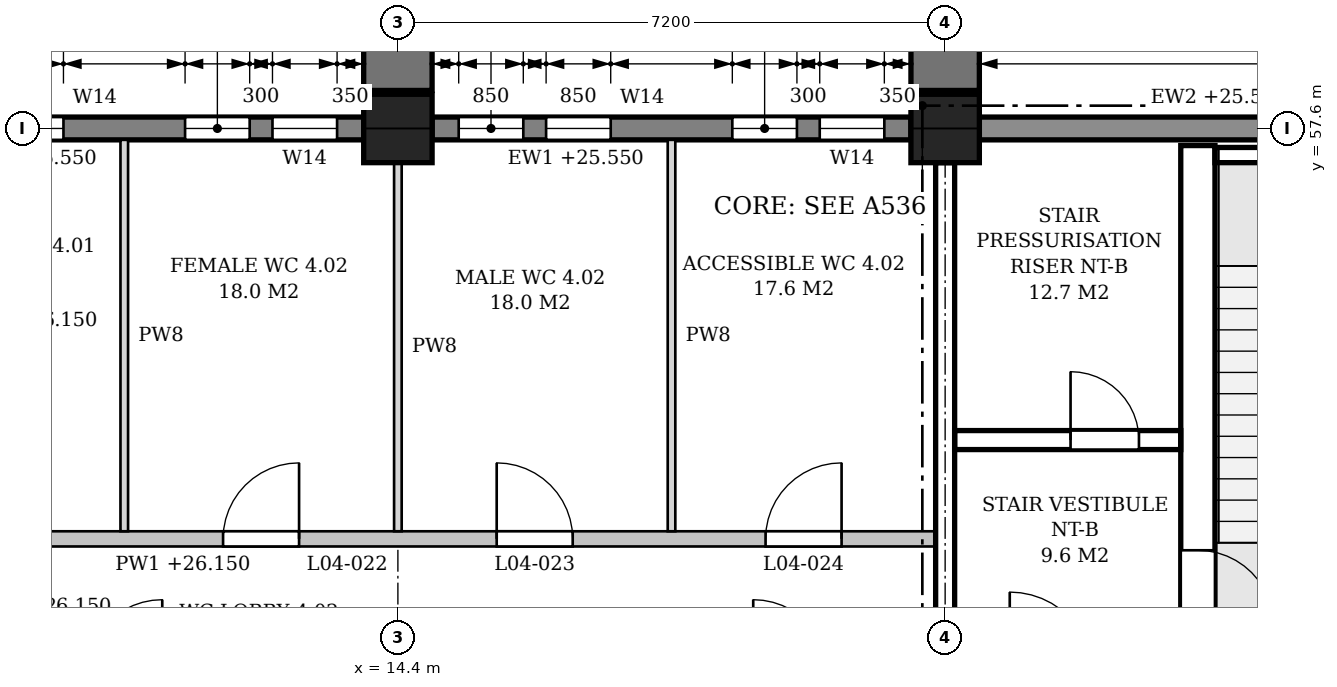
"""IFC4 building model, lengths in metres.
Left out: names, types, materials, properties, quantities, classifications, styles, units other than length and angle.
Written with IfcOpenShell. Run it as: python <this file> out.ifc"""

import sys

from ifc_helpers import new_model, si_unit, direction, frame, frame_2d, origin, origin_2d, place, context, subcontext, project, spatial, polyline, rectangle, outline, extrude, element, fill, save


model = new_model("IFC4")
c1 = context("Model", 3, precision=1e-05, world=origin(), true_north=direction((0.0, 1.0)))
c2 = subcontext(c1, "Body", "Model", "MODEL_VIEW")
j1 = project(units=[si_unit("LENGTHUNIT", "METRE"), si_unit("PLANEANGLEUNIT", "RADIAN")], contexts=[c1])
p1 = place(None, origin())
s1 = spatial("IfcSite", under=j1, at=p1, CompositionType="ELEMENT")
p2 = place(p1, origin())
s2 = spatial("IfcBuilding", under=s1, at=p2, CompositionType="ELEMENT")
p3 = place(p2, frame((0.0, 0.0, 21.6)))
s3 = spatial("IfcBuildingStorey", under=s2, at=p3, CompositionType="ELEMENT", Elevation=21.6)
for number, where, z_axis, x_axis in (
    (1, (14.4, 57.6, 0.0), (0.0, 0.0, 1.0), (1.0, 0.0, 0.0)),
    (2, (21.6, 57.6, 0.0), (0.0, 0.0, 1.0), (1.0, 0.0, 0.0)),
):
    element("IfcColumn", number, at=place(p3, frame(where, z_axis=z_axis, x_axis=x_axis)), inside=s3, PredefinedType="COLUMN", context=c2, shape_type="SweptSolid", body=[
        extrude(rectangle(XDim=0.9, YDim=0.9, at=origin_2d()), origin(), (0.0, 0.0, 1.0), 4.8),
    ])
p4 = place(p3, frame((28.35, 57.6, 0.0), z_axis=(0.0, 0.0, 1.0), x_axis=(-1.0, 0.0, 0.0)))
e3 = element("IfcWall", 3, at=p4, inside=s3, PredefinedType="STANDARD", context=c2, shape_type="SweptSolid", body=[
    extrude(rectangle(XDim=6.3, YDim=0.3, at=frame_2d((3.15, 0.0))), origin(), (0.0, 0.0, 1.0), 3.95),
])
p5 = place(p4, frame((0.9, 0.0, 0.9)))
e4 = element("IfcOpeningElement", 4, at=p5, cuts=e3, PredefinedType="OPENING", context=c2, shape_type="SweptSolid", body=[
    extrude(outline(polyline([(0.0, 0.0), (0.9, 0.0), (0.9, 2.05), (0.45, 2.5), (0.0, 2.05), (0.0, 0.0)])), frame((0.0, 0.16, 0.0), z_axis=(0.0, -1.0, 0.0), x_axis=(1.0, 0.0, 0.0)), (0.0, 0.0, 1.0), 0.32),
])
p6 = place(p3, frame((21.15, 57.6, 0.0), z_axis=(0.0, 0.0, 1.0), x_axis=(-1.0, 0.0, 0.0)))
e5 = element("IfcWall", 5, at=p6, inside=s3, PredefinedType="STANDARD", context=c2, shape_type="SweptSolid", body=[
    extrude(rectangle(XDim=6.3, YDim=0.3, at=frame_2d((3.15, 0.0))), origin(), (0.0, 0.0, 1.0), 3.95),
])
p7 = place(p6, frame((0.35, 0.0, 0.9)))
e6 = element("IfcOpeningElement", 6, at=p7, cuts=e5, PredefinedType="OPENING", context=c2, shape_type="SweptSolid", body=[
    extrude(outline(polyline([(0.0, 0.0), (0.85, 0.0), (0.85, 2.05), (0.425, 2.5), (0.0, 2.05), (0.0, 0.0)])), frame((0.0, 0.16, 0.0), z_axis=(0.0, -1.0, 0.0), x_axis=(1.0, 0.0, 0.0)), (0.0, 0.0, 1.0), 0.32),
])
p8 = place(p6, frame((1.5, 0.0, 0.9)))
e7 = element("IfcOpeningElement", 7, at=p8, cuts=e5, PredefinedType="OPENING", context=c2, shape_type="SweptSolid", body=[
    extrude(outline(polyline([(0.0, 0.0), (0.85, 0.0), (0.85, 2.05), (0.425, 2.5), (0.0, 2.05), (0.0, 0.0)])), frame((0.0, 0.16, 0.0), z_axis=(0.0, -1.0, 0.0), x_axis=(1.0, 0.0, 0.0)), (0.0, 0.0, 1.0), 0.32),
])
p9 = place(p6, frame((3.95, 0.0, 0.9)))
e8 = element("IfcOpeningElement", 8, at=p9, cuts=e5, PredefinedType="OPENING", context=c2, shape_type="SweptSolid", body=[
    extrude(outline(polyline([(0.0, 0.0), (0.85, 0.0), (0.85, 2.05), (0.425, 2.5), (0.0, 2.05), (0.0, 0.0)])), frame((0.0, 0.16, 0.0), z_axis=(0.0, -1.0, 0.0), x_axis=(1.0, 0.0, 0.0)), (0.0, 0.0, 1.0), 0.32),
])
p10 = place(p6, frame((5.1, 0.0, 0.9)))
e9 = element("IfcOpeningElement", 9, at=p10, cuts=e5, PredefinedType="OPENING", context=c2, shape_type="SweptSolid", body=[
    extrude(outline(polyline([(0.0, 0.0), (0.85, 0.0), (0.85, 2.05), (0.425, 2.5), (0.0, 2.05), (0.0, 0.0)])), frame((0.0, 0.16, 0.0), z_axis=(0.0, -1.0, 0.0), x_axis=(1.0, 0.0, 0.0)), (0.0, 0.0, 1.0), 0.32),
])
p11 = place(p3, frame((13.95, 57.6, 0.0), z_axis=(0.0, 0.0, 1.0), x_axis=(-1.0, 0.0, 0.0)))
e10 = element("IfcWall", 10, at=p11, inside=s3, PredefinedType="STANDARD", context=c2, shape_type="SweptSolid", body=[
    extrude(rectangle(XDim=6.3, YDim=0.3, at=frame_2d((3.15, 0.0))), origin(), (0.0, 0.0, 1.0), 3.95),
])
p12 = place(p11, frame((0.35, 0.0, 0.9)))
e11 = element("IfcOpeningElement", 11, at=p12, cuts=e10, PredefinedType="OPENING", context=c2, shape_type="SweptSolid", body=[
    extrude(outline(polyline([(0.0, 0.0), (0.85, 0.0), (0.85, 2.05), (0.425, 2.5), (0.0, 2.05), (0.0, 0.0)])), frame((0.0, 0.16, 0.0), z_axis=(0.0, -1.0, 0.0), x_axis=(1.0, 0.0, 0.0)), (0.0, 0.0, 1.0), 0.32),
])
p13 = place(p11, frame((1.5, 0.0, 0.9)))
e12 = element("IfcOpeningElement", 12, at=p13, cuts=e10, PredefinedType="OPENING", context=c2, shape_type="SweptSolid", body=[
    extrude(outline(polyline([(0.0, 0.0), (0.85, 0.0), (0.85, 2.05), (0.425, 2.5), (0.0, 2.05), (0.0, 0.0)])), frame((0.0, 0.16, 0.0), z_axis=(0.0, -1.0, 0.0), x_axis=(1.0, 0.0, 0.0)), (0.0, 0.0, 1.0), 0.32),
])
p14 = place(p11, frame((3.95, 0.0, 0.9)))
e13 = element("IfcOpeningElement", 13, at=p14, cuts=e10, PredefinedType="OPENING", context=c2, shape_type="SweptSolid", body=[
    extrude(outline(polyline([(0.0, 0.0), (0.85, 0.0), (0.85, 2.05), (0.425, 2.5), (0.0, 2.05), (0.0, 0.0)])), frame((0.0, 0.16, 0.0), z_axis=(0.0, -1.0, 0.0), x_axis=(1.0, 0.0, 0.0)), (0.0, 0.0, 1.0), 0.32),
])
p15 = place(p11, frame((5.1, 0.0, 0.9)))
e14 = element("IfcOpeningElement", 14, at=p15, cuts=e10, PredefinedType="OPENING", context=c2, shape_type="SweptSolid", body=[
    extrude(outline(polyline([(0.0, 0.0), (0.85, 0.0), (0.85, 2.05), (0.425, 2.5), (0.0, 2.05), (0.0, 0.0)])), frame((0.0, 0.16, 0.0), z_axis=(0.0, -1.0, 0.0), x_axis=(1.0, 0.0, 0.0)), (0.0, 0.0, 1.0), 0.32),
])
for number, where, z_axis, x_axis in (
    (15, (14.4, 58.1, -0.25), (0.0, 0.0, 1.0), (0.0, 1.0, 0.0)),
    (16, (21.6, 58.1, -0.25), (0.0, 0.0, 1.0), (0.0, 1.0, 0.0)),
):
    element("IfcWall", number, at=place(p3, frame(where, z_axis=z_axis, x_axis=x_axis)), inside=s3, PredefinedType="POLYGONAL", context=c2, shape_type="SweptSolid", body=[
        extrude(outline(polyline([(1.3, 0.0), (1.3, 18.9), (1.1, 19.2), (0.0, 19.2), (0.0, 0.0), (1.3, 0.0)])), frame((0.0, 0.45, 0.0), z_axis=(0.0, -1.0, 0.0), x_axis=(1.0, 0.0, 0.0)), (0.0, 0.0, 1.0), 0.9),
    ])
p16 = place(p3, frame((21.6, 50.85, 0.0), z_axis=(0.0, 0.0, 1.0), x_axis=(0.0, 1.0, 0.0)))
e17 = element("IfcWall", 17, at=p16, inside=s3, PredefinedType="SHEAR", context=c2, shape_type="SweptSolid", body=[
    extrude(rectangle(XDim=6.3, YDim=0.25, at=frame_2d((3.15, 0.0))), origin(), (0.0, 0.0, 1.0), 3.8),
])
p17 = place(p3, frame((25.15, 57.25, -0.25), z_axis=(0.0, 0.0, 1.0), x_axis=(1.0, 0.0, 0.0)))
e18 = element("IfcWall", 18, at=p17, inside=s3, PredefinedType="SHEAR", context=c2, shape_type="SweptSolid", body=[
    extrude(rectangle(XDim=1.4, YDim=0.2, at=frame_2d((0.7, 0.0))), origin(), (0.0, 0.0, 1.0), 4.8),
])
p18 = place(p3, frame((24.925, 50.525, 0.0), z_axis=(0.0, 0.0, 1.0), x_axis=(0.0, 1.0, 0.0)))
e19 = element("IfcWall", 19, at=p18, inside=s3, PredefinedType="SHEAR", context=c2, shape_type="SweptSolid", body=[
    extrude(rectangle(XDim=6.85, YDim=0.45, at=frame_2d((3.425, 0.0))), origin(), (0.0, 0.0, 1.0), 4.55),
])
p19 = place(p18, frame((0.525, 0.0, 0.0)))
e20 = element("IfcOpeningElement", 20, at=p19, cuts=e19, PredefinedType="OPENING", context=c2, shape_type="SweptSolid", body=[
    extrude(rectangle(XDim=1.0, YDim=2.1, at=frame_2d((0.5, 1.05))), frame((0.0, 0.235, 0.0), z_axis=(0.0, -1.0, 0.0), x_axis=(1.0, 0.0, 0.0)), (0.0, 0.0, 1.0), 0.47),
])
p20 = place(p3, frame((21.725, 53.5, 0.0), z_axis=(0.0, 0.0, 1.0), x_axis=(1.0, 0.0, 0.0)))
e21 = element("IfcWall", 21, at=p20, inside=s3, PredefinedType="SHEAR", context=c2, shape_type="SweptSolid", body=[
    extrude(rectangle(XDim=2.975, YDim=0.25, at=frame_2d((1.487, 0.0))), origin(), (0.0, 0.0, 1.0), 4.55),
])
p21 = place(p20, frame((1.525, 0.0, 0.0)))
e22 = element("IfcOpeningElement", 22, at=p21, cuts=e21, PredefinedType="OPENING", context=c2, shape_type="SweptSolid", body=[
    extrude(rectangle(XDim=0.9, YDim=2.1, at=frame_2d((0.45, 1.05))), frame((0.0, 0.135, 0.0), z_axis=(0.0, -1.0, 0.0), x_axis=(1.0, 0.0, 0.0)), (0.0, 0.0, 1.0), 0.27),
])
p22 = place(p3, frame((7.325, 52.2, 0.0), z_axis=(0.0, 0.0, 1.0), x_axis=(1.0, 0.0, 0.0)))
e23 = element("IfcWall", 23, at=p22, inside=s3, PredefinedType="PARTITIONING", context=c2, shape_type="SweptSolid", body=[
    extrude(outline(polyline([(0.0, 0.0), (14.15, 0.0), (14.15, 3.8), (14.025, 3.8), (14.025, 4.55), (7.325, 4.55), (7.325, 3.8), (6.825, 3.8), (6.825, 4.55), (0.125, 4.55), (0.125, 3.8), (0.0, 3.8), (0.0, 0.0)])), frame((0.0, 0.1, 0.0), z_axis=(0.0, -1.0, 0.0), x_axis=(1.0, 0.0, 0.0)), (0.0, 0.0, 1.0), 0.2),
])
p23 = place(p22, frame((1.238, 0.0, 0.0)))
e24 = element("IfcOpeningElement", 24, at=p23, cuts=e23, PredefinedType="OPENING", context=c2, shape_type="SweptSolid", body=[
    extrude(rectangle(XDim=1.0, YDim=2.1, at=frame_2d((0.5, 1.05))), frame((0.0, 0.11, 0.0), z_axis=(0.0, -1.0, 0.0), x_axis=(1.0, 0.0, 0.0)), (0.0, 0.0, 1.0), 0.22),
])
p24 = place(p22, frame((4.775, 0.0, 0.0)))
e25 = element("IfcOpeningElement", 25, at=p24, cuts=e23, PredefinedType="OPENING", context=c2, shape_type="SweptSolid", body=[
    extrude(rectangle(XDim=1.0, YDim=2.1, at=frame_2d((0.5, 1.05))), frame((0.0, 0.11, 0.0), z_axis=(0.0, -1.0, 0.0), x_axis=(1.0, 0.0, 0.0)), (0.0, 0.0, 1.0), 0.22),
])
p25 = place(p22, frame((8.375, 0.0, 0.0)))
e26 = element("IfcOpeningElement", 26, at=p25, cuts=e23, PredefinedType="OPENING", context=c2, shape_type="SweptSolid", body=[
    extrude(rectangle(XDim=1.0, YDim=2.1, at=frame_2d((0.5, 1.05))), frame((0.0, 0.11, 0.0), z_axis=(0.0, -1.0, 0.0), x_axis=(1.0, 0.0, 0.0)), (0.0, 0.0, 1.0), 0.22),
])
p26 = place(p22, frame((11.913, 0.0, 0.0)))
e27 = element("IfcOpeningElement", 27, at=p26, cuts=e23, PredefinedType="OPENING", context=c2, shape_type="SweptSolid", body=[
    extrude(rectangle(XDim=1.0, YDim=2.1, at=frame_2d((0.5, 1.05))), frame((0.0, 0.11, 0.0), z_axis=(0.0, -1.0, 0.0), x_axis=(1.0, 0.0, 0.0)), (0.0, 0.0, 1.0), 0.22),
])
p27 = place(p3, frame((10.8, 52.3, 0.0), z_axis=(0.0, 0.0, 1.0), x_axis=(0.0, 1.0, 0.0)))
e28 = element("IfcWall", 28, at=p27, inside=s3, PredefinedType="PARTITIONING", context=c2, shape_type="SweptSolid", body=[
    extrude(rectangle(XDim=5.15, YDim=0.1, at=frame_2d((2.575, 0.0))), origin(), (0.0, 0.0, 1.0), 3.8),
])
p28 = place(p3, frame((14.4, 52.3, 0.0), z_axis=(0.0, 0.0, 1.0), x_axis=(0.0, 1.0, 0.0)))
e29 = element("IfcWall", 29, at=p28, inside=s3, PredefinedType="PARTITIONING", context=c2, shape_type="SweptSolid", body=[
    extrude(rectangle(XDim=4.85, YDim=0.1, at=frame_2d((2.425, 0.0))), origin(), (0.0, 0.0, 1.0), 3.8),
])
p29 = place(p3, frame((18.0, 52.3, 0.0), z_axis=(0.0, 0.0, 1.0), x_axis=(0.0, 1.0, 0.0)))
e30 = element("IfcWall", 30, at=p29, inside=s3, PredefinedType="PARTITIONING", context=c2, shape_type="SweptSolid", body=[
    extrude(rectangle(XDim=5.15, YDim=0.1, at=frame_2d((2.575, 0.0))), origin(), (0.0, 0.0, 1.0), 3.8),
])
p30 = place(p7, origin())
e31 = element("IfcWindow", 31, at=p30, inside=s3, PartitioningType="SINGLE_PANEL", PredefinedType="WINDOW", context=c2, shape_type="SweptSolid", body=[
    extrude(outline(polyline([(0.0, 0.0), (0.85, 0.0), (0.85, 2.05), (0.425, 2.5), (0.0, 2.05), (0.0, 0.0)])), frame((0.0, 0.03, 0.0), z_axis=(0.0, -1.0, 0.0), x_axis=(1.0, 0.0, 0.0)), (0.0, 0.0, 1.0), 0.06),
])
fill(e6, e31)
p31 = place(p8, origin())
e32 = element("IfcWindow", 32, at=p31, inside=s3, PartitioningType="SINGLE_PANEL", PredefinedType="WINDOW", context=c2, shape_type="SweptSolid", body=[
    extrude(outline(polyline([(0.0, 0.0), (0.85, 0.0), (0.85, 2.05), (0.425, 2.5), (0.0, 2.05), (0.0, 0.0)])), frame((0.0, 0.03, 0.0), z_axis=(0.0, -1.0, 0.0), x_axis=(1.0, 0.0, 0.0)), (0.0, 0.0, 1.0), 0.06),
])
fill(e7, e32)
p32 = place(p9, origin())
e33 = element("IfcWindow", 33, at=p32, inside=s3, PartitioningType="SINGLE_PANEL", PredefinedType="WINDOW", context=c2, shape_type="SweptSolid", body=[
    extrude(outline(polyline([(0.0, 0.0), (0.85, 0.0), (0.85, 2.05), (0.425, 2.5), (0.0, 2.05), (0.0, 0.0)])), frame((0.0, 0.03, 0.0), z_axis=(0.0, -1.0, 0.0), x_axis=(1.0, 0.0, 0.0)), (0.0, 0.0, 1.0), 0.06),
])
fill(e8, e33)
p33 = place(p10, origin())
e34 = element("IfcWindow", 34, at=p33, inside=s3, PartitioningType="SINGLE_PANEL", PredefinedType="WINDOW", context=c2, shape_type="SweptSolid", body=[
    extrude(outline(polyline([(0.0, 0.0), (0.85, 0.0), (0.85, 2.05), (0.425, 2.5), (0.0, 2.05), (0.0, 0.0)])), frame((0.0, 0.03, 0.0), z_axis=(0.0, -1.0, 0.0), x_axis=(1.0, 0.0, 0.0)), (0.0, 0.0, 1.0), 0.06),
])
fill(e9, e34)
p34 = place(p12, origin())
e35 = element("IfcWindow", 35, at=p34, inside=s3, PartitioningType="SINGLE_PANEL", PredefinedType="WINDOW", context=c2, shape_type="SweptSolid", body=[
    extrude(outline(polyline([(0.0, 0.0), (0.85, 0.0), (0.85, 2.05), (0.425, 2.5), (0.0, 2.05), (0.0, 0.0)])), frame((0.0, 0.03, 0.0), z_axis=(0.0, -1.0, 0.0), x_axis=(1.0, 0.0, 0.0)), (0.0, 0.0, 1.0), 0.06),
])
fill(e11, e35)
p35 = place(p13, origin())
e36 = element("IfcWindow", 36, at=p35, inside=s3, PartitioningType="SINGLE_PANEL", PredefinedType="WINDOW", context=c2, shape_type="SweptSolid", body=[
    extrude(outline(polyline([(0.0, 0.0), (0.85, 0.0), (0.85, 2.05), (0.425, 2.5), (0.0, 2.05), (0.0, 0.0)])), frame((0.0, 0.03, 0.0), z_axis=(0.0, -1.0, 0.0), x_axis=(1.0, 0.0, 0.0)), (0.0, 0.0, 1.0), 0.06),
])
fill(e12, e36)
p36 = place(p14, origin())
e37 = element("IfcWindow", 37, at=p36, inside=s3, PartitioningType="SINGLE_PANEL", PredefinedType="WINDOW", context=c2, shape_type="SweptSolid", body=[
    extrude(outline(polyline([(0.0, 0.0), (0.85, 0.0), (0.85, 2.05), (0.425, 2.5), (0.0, 2.05), (0.0, 0.0)])), frame((0.0, 0.03, 0.0), z_axis=(0.0, -1.0, 0.0), x_axis=(1.0, 0.0, 0.0)), (0.0, 0.0, 1.0), 0.06),
])
fill(e13, e37)
p37 = place(p19, frame((1.0, 0.0, 0.0), z_axis=(0.0, 0.0, 1.0), x_axis=(-1.0, 0.0, 0.0)))
e38 = element("IfcDoor", 38, at=p37, inside=s3, OperationType="SINGLE_SWING_RIGHT", PredefinedType="DOOR", context=c2, shape_type="SweptSolid", body=[
    extrude(rectangle(XDim=1.0, YDim=2.1, at=frame_2d((0.5, 1.05))), frame((0.0, 0.025, 0.0), z_axis=(0.0, -1.0, 0.0), x_axis=(1.0, 0.0, 0.0)), (0.0, 0.0, 1.0), 0.05),
])
fill(e20, e38)
p38 = place(p21, origin())
e39 = element("IfcDoor", 39, at=p38, inside=s3, OperationType="SINGLE_SWING_LEFT", PredefinedType="DOOR", context=c2, shape_type="SweptSolid", body=[
    extrude(rectangle(XDim=0.9, YDim=2.1, at=frame_2d((0.45, 1.05))), frame((0.0, 0.025, 0.0), z_axis=(0.0, -1.0, 0.0), x_axis=(1.0, 0.0, 0.0)), (0.0, 0.0, 1.0), 0.05),
])
fill(e22, e39)
p39 = place(p24, origin())
e40 = element("IfcDoor", 40, at=p39, inside=s3, OperationType="SINGLE_SWING_RIGHT", PredefinedType="DOOR", context=c2, shape_type="SweptSolid", body=[
    extrude(rectangle(XDim=1.0, YDim=2.1, at=frame_2d((0.5, 1.05))), frame((0.0, 0.025, 0.0), z_axis=(0.0, -1.0, 0.0), x_axis=(1.0, 0.0, 0.0)), (0.0, 0.0, 1.0), 0.05),
])
fill(e25, e40)
p40 = place(p25, origin())
e41 = element("IfcDoor", 41, at=p40, inside=s3, OperationType="SINGLE_SWING_LEFT", PredefinedType="DOOR", context=c2, shape_type="SweptSolid", body=[
    extrude(rectangle(XDim=1.0, YDim=2.1, at=frame_2d((0.5, 1.05))), frame((0.0, 0.025, 0.0), z_axis=(0.0, -1.0, 0.0), x_axis=(1.0, 0.0, 0.0)), (0.0, 0.0, 1.0), 0.05),
])
fill(e26, e41)
p41 = place(p26, origin())
e42 = element("IfcDoor", 42, at=p41, inside=s3, OperationType="SINGLE_SWING_RIGHT", PredefinedType="DOOR", context=c2, shape_type="SweptSolid", body=[
    extrude(rectangle(XDim=1.0, YDim=2.1, at=frame_2d((0.5, 1.05))), frame((0.0, 0.025, 0.0), z_axis=(0.0, -1.0, 0.0), x_axis=(1.0, 0.0, 0.0)), (0.0, 0.0, 1.0), 0.05),
])
fill(e27, e42)
save(model, sys.argv[1])
